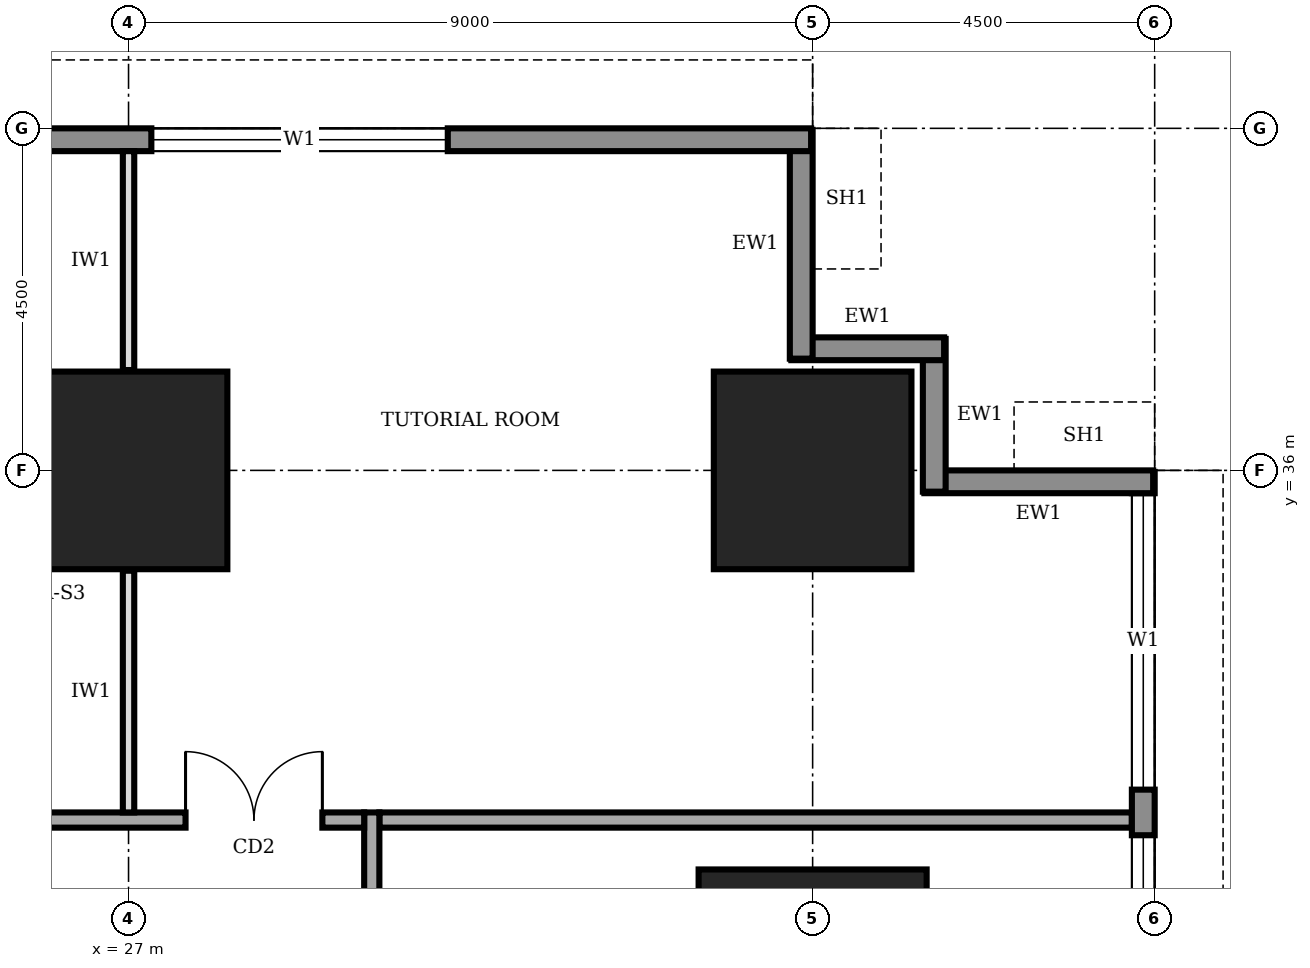
"""IFC4 building model, lengths in metres.
Left out: names, types, materials, properties, quantities, classifications, styles, units other than length and angle.
Written with IfcOpenShell. Run it as: python <this file> out.ifc"""

import sys

from ifc_helpers import new_model, si_unit, direction, frame, frame_2d, origin, origin_2d, place, context, subcontext, project, spatial, rectangle, extrude, element, fill, save


model = new_model("IFC4")
c1 = context("Model", 3, precision=1e-05, world=origin(), true_north=direction((0.0, 1.0)))
c2 = subcontext(c1, "Body", "Model", "MODEL_VIEW")
j1 = project(units=[si_unit("LENGTHUNIT", "METRE"), si_unit("PLANEANGLEUNIT", "RADIAN")], contexts=[c1])
p1 = place(None, origin())
s1 = spatial("IfcSite", under=j1, at=p1, CompositionType="ELEMENT")
p2 = place(p1, origin())
s2 = spatial("IfcBuilding", under=s1, at=p2, CompositionType="ELEMENT")
p3 = place(p2, frame((0.0, 0.0, 37.0)))
s3 = spatial("IfcBuildingStorey", under=s2, at=p3, CompositionType="ELEMENT", Elevation=37.0)
p4 = place(p3, frame((36.0, 29.25, 0.0), z_axis=(0.0, 0.0, 1.0), x_axis=(1.0, 0.0, 0.0)))
e1 = element("IfcColumn", 1, at=p4, inside=s3, PredefinedType="COLUMN", context=c2, shape_type="SweptSolid", body=[
    extrude(rectangle(XDim=3.0, YDim=3.0, at=origin_2d()), origin(), (0.0, 0.0, 1.0), 4.0),
])
for number, where, z_axis, x_axis in (
    (2, (27.0, 36.0, 0.0), (0.0, 0.0, 1.0), (1.0, 0.0, 0.0)),
    (3, (36.0, 36.0, 0.0), (0.0, 0.0, 1.0), (1.0, 0.0, 0.0)),
):
    element("IfcColumn", number, at=place(p3, frame(where, z_axis=z_axis, x_axis=x_axis)), inside=s3, PredefinedType="COLUMN", context=c2, shape_type="SweptSolid", body=[
        extrude(rectangle(XDim=2.6, YDim=2.6, at=origin_2d()), origin(), (0.0, 0.0, 1.0), 4.0),
    ])
p5 = place(p3, frame((40.35, 4.52, 0.0), z_axis=(0.0, 0.0, 1.0), x_axis=(0.0, 1.0, 0.0)))
e4 = element("IfcWall", 4, at=p5, inside=s3, PredefinedType="STANDARD", context=c2, shape_type="SweptSolid", body=[
    extrude(rectangle(XDim=31.46, YDim=0.3, at=frame_2d((15.73, 0.0))), origin(), (0.0, 0.0, 1.0), 3.75),
])
p6 = place(p5, frame((4.78, 0.0, 0.9)))
e5 = element("IfcOpeningElement", 5, at=p6, cuts=e4, PredefinedType="OPENING", context=c2, shape_type="SweptSolid", body=[
    extrude(rectangle(XDim=3.9, YDim=2.2, at=frame_2d((1.95, 1.1))), frame((0.0, 0.16, 0.0), z_axis=(0.0, -1.0, 0.0), x_axis=(1.0, 0.0, 0.0)), (0.0, 0.0, 1.0), 0.32),
])
p7 = place(p5, frame((9.28, 0.0, 0.9)))
e6 = element("IfcOpeningElement", 6, at=p7, cuts=e4, PredefinedType="OPENING", context=c2, shape_type="SweptSolid", body=[
    extrude(rectangle(XDim=3.9, YDim=2.2, at=frame_2d((1.95, 1.1))), frame((0.0, 0.16, 0.0), z_axis=(0.0, -1.0, 0.0), x_axis=(1.0, 0.0, 0.0)), (0.0, 0.0, 1.0), 0.32),
])
p8 = place(p5, frame((13.78, 0.0, 0.9)))
e7 = element("IfcOpeningElement", 7, at=p8, cuts=e4, PredefinedType="OPENING", context=c2, shape_type="SweptSolid", body=[
    extrude(rectangle(XDim=3.9, YDim=2.2, at=frame_2d((1.95, 1.1))), frame((0.0, 0.16, 0.0), z_axis=(0.0, -1.0, 0.0), x_axis=(1.0, 0.0, 0.0)), (0.0, 0.0, 1.0), 0.32),
])
p9 = place(p5, frame((18.28, 0.0, 0.9)))
e8 = element("IfcOpeningElement", 8, at=p9, cuts=e4, PredefinedType="OPENING", context=c2, shape_type="SweptSolid", body=[
    extrude(rectangle(XDim=3.9, YDim=2.2, at=frame_2d((1.95, 1.1))), frame((0.0, 0.16, 0.0), z_axis=(0.0, -1.0, 0.0), x_axis=(1.0, 0.0, 0.0)), (0.0, 0.0, 1.0), 0.32),
])
p10 = place(p5, frame((22.78, 0.0, 0.9)))
e9 = element("IfcOpeningElement", 9, at=p10, cuts=e4, PredefinedType="OPENING", context=c2, shape_type="SweptSolid", body=[
    extrude(rectangle(XDim=3.9, YDim=2.2, at=frame_2d((1.95, 1.1))), frame((0.0, 0.16, 0.0), z_axis=(0.0, -1.0, 0.0), x_axis=(1.0, 0.0, 0.0)), (0.0, 0.0, 1.0), 0.32),
])
p11 = place(p5, frame((27.28, 0.0, 0.9)))
e10 = element("IfcOpeningElement", 10, at=p11, cuts=e4, PredefinedType="OPENING", context=c2, shape_type="SweptSolid", body=[
    extrude(rectangle(XDim=3.9, YDim=2.2, at=frame_2d((1.95, 1.1))), frame((0.0, 0.16, 0.0), z_axis=(0.0, -1.0, 0.0), x_axis=(1.0, 0.0, 0.0)), (0.0, 0.0, 1.0), 0.32),
])
p12 = place(p3, frame((40.48, 35.85, 0.0), z_axis=(0.0, 0.0, 1.0), x_axis=(-1.0, 0.0, 0.0)))
e11 = element("IfcWall", 11, at=p12, inside=s3, PredefinedType="STANDARD", context=c2, shape_type="SweptSolid", body=[
    extrude(rectangle(XDim=3.01, YDim=0.3, at=frame_2d((1.505, 0.0))), origin(), (0.0, 0.0, 1.0), 2.85),
])
for number, where, z_axis, x_axis in (
    (12, (37.6, 35.72, 0.0), (0.0, 0.0, 1.0), (0.0, 1.0, 0.0)),
    (13, (37.73, 37.6, 0.0), (0.0, 0.0, 1.0), (-1.0, 0.0, 0.0)),
):
    element("IfcWall", number, at=place(p3, frame(where, z_axis=z_axis, x_axis=x_axis)), inside=s3, PredefinedType="STANDARD", context=c2, shape_type="SweptSolid", body=[
        extrude(rectangle(XDim=2.01, YDim=0.3, at=frame_2d((1.005, 0.0))), origin(), (0.0, 0.0, 1.0), 3.75),
    ])
p13 = place(p3, frame((35.85, 37.47, 0.0), z_axis=(0.0, 0.0, 1.0), x_axis=(0.0, 1.0, 0.0)))
e14 = element("IfcWall", 14, at=p13, inside=s3, PredefinedType="STANDARD", context=c2, shape_type="SweptSolid", body=[
    extrude(rectangle(XDim=3.01, YDim=0.3, at=frame_2d((1.505, 0.0))), origin(), (0.0, 0.0, 1.0), 2.85),
])
p14 = place(p3, frame((35.98, 40.35, 0.0), z_axis=(0.0, 0.0, 1.0), x_axis=(-1.0, 0.0, 0.0)))
e15 = element("IfcWall", 15, at=p14, inside=s3, PredefinedType="STANDARD", context=c2, shape_type="SweptSolid", body=[
    extrude(rectangle(XDim=31.46, YDim=0.3, at=frame_2d((15.73, 0.0))), origin(), (0.0, 0.0, 1.0), 3.75),
])
p15 = place(p14, frame((27.28, 0.0, 0.9)))
e16 = element("IfcOpeningElement", 16, at=p15, cuts=e15, PredefinedType="OPENING", context=c2, shape_type="SweptSolid", body=[
    extrude(rectangle(XDim=3.9, YDim=2.2, at=frame_2d((1.95, 1.1))), frame((0.0, 0.16, 0.0), z_axis=(0.0, -1.0, 0.0), x_axis=(1.0, 0.0, 0.0)), (0.0, 0.0, 1.0), 0.32),
])
p16 = place(p14, frame((22.78, 0.0, 0.9)))
e17 = element("IfcOpeningElement", 17, at=p16, cuts=e15, PredefinedType="OPENING", context=c2, shape_type="SweptSolid", body=[
    extrude(rectangle(XDim=3.9, YDim=2.2, at=frame_2d((1.95, 1.1))), frame((0.0, 0.16, 0.0), z_axis=(0.0, -1.0, 0.0), x_axis=(1.0, 0.0, 0.0)), (0.0, 0.0, 1.0), 0.32),
])
p17 = place(p14, frame((4.78, 0.0, 0.9)))
e18 = element("IfcOpeningElement", 18, at=p17, cuts=e15, PredefinedType="OPENING", context=c2, shape_type="SweptSolid", body=[
    extrude(rectangle(XDim=3.9, YDim=2.2, at=frame_2d((1.95, 1.1))), frame((0.0, 0.16, 0.0), z_axis=(0.0, -1.0, 0.0), x_axis=(1.0, 0.0, 0.0)), (0.0, 0.0, 1.0), 0.32),
])
p18 = place(p3, frame((30.2, 9.2, 0.0), z_axis=(0.0, 0.0, 1.0), x_axis=(0.0, 1.0, 0.0)))
e19 = element("IfcWall", 19, at=p18, inside=s3, PredefinedType="SOLIDWALL", context=c2, shape_type="SweptSolid", body=[
    extrude(rectangle(XDim=22.3, YDim=0.2, at=frame_2d((11.15, 0.0))), origin(), (0.0, 0.0, 1.0), 3.75),
])
p19 = place(p18, frame((1.55, 0.0, 0.0)))
e20 = element("IfcOpeningElement", 20, at=p19, cuts=e19, PredefinedType="OPENING", context=c2, shape_type="SweptSolid", body=[
    extrude(rectangle(XDim=1.0, YDim=2.1, at=frame_2d((0.5, 1.05))), frame((0.0, 0.11, 0.0), z_axis=(0.0, -1.0, 0.0), x_axis=(1.0, 0.0, 0.0)), (0.0, 0.0, 1.0), 0.22),
])
p20 = place(p18, frame((8.3, 0.0, 0.0)))
e21 = element("IfcOpeningElement", 21, at=p20, cuts=e19, PredefinedType="OPENING", context=c2, shape_type="SweptSolid", body=[
    extrude(rectangle(XDim=1.0, YDim=2.1, at=frame_2d((0.5, 1.05))), frame((0.0, 0.11, 0.0), z_axis=(0.0, -1.0, 0.0), x_axis=(1.0, 0.0, 0.0)), (0.0, 0.0, 1.0), 0.22),
])
p21 = place(p18, frame((17.3, 0.0, 0.0)))
e22 = element("IfcOpeningElement", 22, at=p21, cuts=e19, PredefinedType="OPENING", context=c2, shape_type="SweptSolid", body=[
    extrude(rectangle(XDim=1.0, YDim=2.1, at=frame_2d((0.5, 1.05))), frame((0.0, 0.11, 0.0), z_axis=(0.0, -1.0, 0.0), x_axis=(1.0, 0.0, 0.0)), (0.0, 0.0, 1.0), 0.22),
])
p22 = place(p3, frame((30.1, 31.4, 0.0), z_axis=(0.0, 0.0, 1.0), x_axis=(-1.0, 0.0, 0.0)))
e23 = element("IfcWall", 23, at=p22, inside=s3, PredefinedType="SOLIDWALL", context=c2, shape_type="SweptSolid", body=[
    extrude(rectangle(XDim=18.4, YDim=0.2, at=frame_2d((9.2, 0.0))), origin(), (0.0, 0.0, 1.0), 3.75),
])
p23 = place(p22, frame((16.925, 0.0, 0.0)))
e24 = element("IfcOpeningElement", 24, at=p23, cuts=e23, PredefinedType="OPENING", context=c2, shape_type="SweptSolid", body=[
    extrude(rectangle(XDim=1.0, YDim=2.1, at=frame_2d((0.5, 1.05))), frame((0.0, 0.11, 0.0), z_axis=(0.0, -1.0, 0.0), x_axis=(1.0, 0.0, 0.0)), (0.0, 0.0, 1.0), 0.22),
])
p24 = place(p22, frame((13.85, 0.0, 0.0)))
e25 = element("IfcOpeningElement", 25, at=p24, cuts=e23, PredefinedType="OPENING", context=c2, shape_type="SweptSolid", body=[
    extrude(rectangle(XDim=1.0, YDim=2.1, at=frame_2d((0.5, 1.05))), frame((0.0, 0.11, 0.0), z_axis=(0.0, -1.0, 0.0), x_axis=(1.0, 0.0, 0.0)), (0.0, 0.0, 1.0), 0.22),
])
p25 = place(p22, frame((7.1, 0.0, 0.0)))
e26 = element("IfcOpeningElement", 26, at=p25, cuts=e23, PredefinedType="OPENING", context=c2, shape_type="SweptSolid", body=[
    extrude(rectangle(XDim=1.0, YDim=2.1, at=frame_2d((0.5, 1.05))), frame((0.0, 0.11, 0.0), z_axis=(0.0, -1.0, 0.0), x_axis=(1.0, 0.0, 0.0)), (0.0, 0.0, 1.0), 0.22),
])
p26 = place(p22, frame((0.55, 0.0, 0.0)))
e27 = element("IfcOpeningElement", 27, at=p26, cuts=e23, PredefinedType="OPENING", context=c2, shape_type="SweptSolid", body=[
    extrude(rectangle(XDim=1.8, YDim=2.1, at=frame_2d((0.9, 1.05))), frame((0.0, 0.11, 0.0), z_axis=(0.0, -1.0, 0.0), x_axis=(1.0, 0.0, 0.0)), (0.0, 0.0, 1.0), 0.22),
])
p27 = place(p3, frame((30.3, 31.4, 0.0), z_axis=(0.0, 0.0, 1.0), x_axis=(1.0, 0.0, 0.0)))
e28 = element("IfcWall", 28, at=p27, inside=s3, PredefinedType="SOLIDWALL", context=c2, shape_type="SweptSolid", body=[
    extrude(rectangle(XDim=9.9, YDim=0.2, at=frame_2d((4.95, 0.0))), origin(), (0.0, 0.0, 1.0), 3.75),
])
p28 = place(p3, frame((27.0, 31.5, 0.0), z_axis=(0.0, 0.0, 1.0), x_axis=(0.0, 1.0, 0.0)))
e29 = element("IfcWall", 29, at=p28, inside=s3, PredefinedType="PARTITIONING", context=c2, shape_type="SweptSolid", body=[
    extrude(rectangle(XDim=3.18, YDim=0.15, at=frame_2d((1.59, 0.0))), origin(), (0.0, 0.0, 1.0), 2.85),
])
p29 = place(p3, frame((27.0, 37.32, 0.0), z_axis=(0.0, 0.0, 1.0), x_axis=(0.0, 1.0, 0.0)))
e30 = element("IfcWall", 30, at=p29, inside=s3, PredefinedType="PARTITIONING", context=c2, shape_type="SweptSolid", body=[
    extrude(rectangle(XDim=2.88, YDim=0.15, at=frame_2d((1.44, 0.0))), origin(), (0.0, 0.0, 1.0), 2.85),
])
p30 = place(p10, origin())
e31 = element("IfcWindow", 31, at=p30, inside=s3, PartitioningType="SINGLE_PANEL", PredefinedType="WINDOW", context=c2, shape_type="SweptSolid", body=[
    extrude(rectangle(XDim=3.9, YDim=2.2, at=frame_2d((1.95, 1.1))), frame((0.0, 0.03, 0.0), z_axis=(0.0, -1.0, 0.0), x_axis=(1.0, 0.0, 0.0)), (0.0, 0.0, 1.0), 0.06),
])
fill(e9, e31)
p31 = place(p11, origin())
e32 = element("IfcWindow", 32, at=p31, inside=s3, PartitioningType="SINGLE_PANEL", PredefinedType="WINDOW", context=c2, shape_type="SweptSolid", body=[
    extrude(rectangle(XDim=3.9, YDim=2.2, at=frame_2d((1.95, 1.1))), frame((0.0, 0.03, 0.0), z_axis=(0.0, -1.0, 0.0), x_axis=(1.0, 0.0, 0.0)), (0.0, 0.0, 1.0), 0.06),
])
fill(e10, e32)
p32 = place(p17, origin())
e33 = element("IfcWindow", 33, at=p32, inside=s3, PartitioningType="SINGLE_PANEL", PredefinedType="WINDOW", context=c2, shape_type="SweptSolid", body=[
    extrude(rectangle(XDim=3.9, YDim=2.2, at=frame_2d((1.95, 1.1))), frame((0.0, 0.03, 0.0), z_axis=(0.0, -1.0, 0.0), x_axis=(1.0, 0.0, 0.0)), (0.0, 0.0, 1.0), 0.06),
])
fill(e18, e33)
p33 = place(p26, frame((1.8, 0.0, 0.0), z_axis=(0.0, 0.0, 1.0), x_axis=(-1.0, 0.0, 0.0)))
e34 = element("IfcDoor", 34, at=p33, inside=s3, OperationType="DOUBLE_DOOR_SINGLE_SWING", PredefinedType="DOOR", context=c2, shape_type="SweptSolid", body=[
    extrude(rectangle(XDim=1.8, YDim=2.1, at=frame_2d((0.9, 1.05))), frame((0.0, 0.025, 0.0), z_axis=(0.0, -1.0, 0.0), x_axis=(1.0, 0.0, 0.0)), (0.0, 0.0, 1.0), 0.05),
])
fill(e27, e34)
save(model, sys.argv[1])
